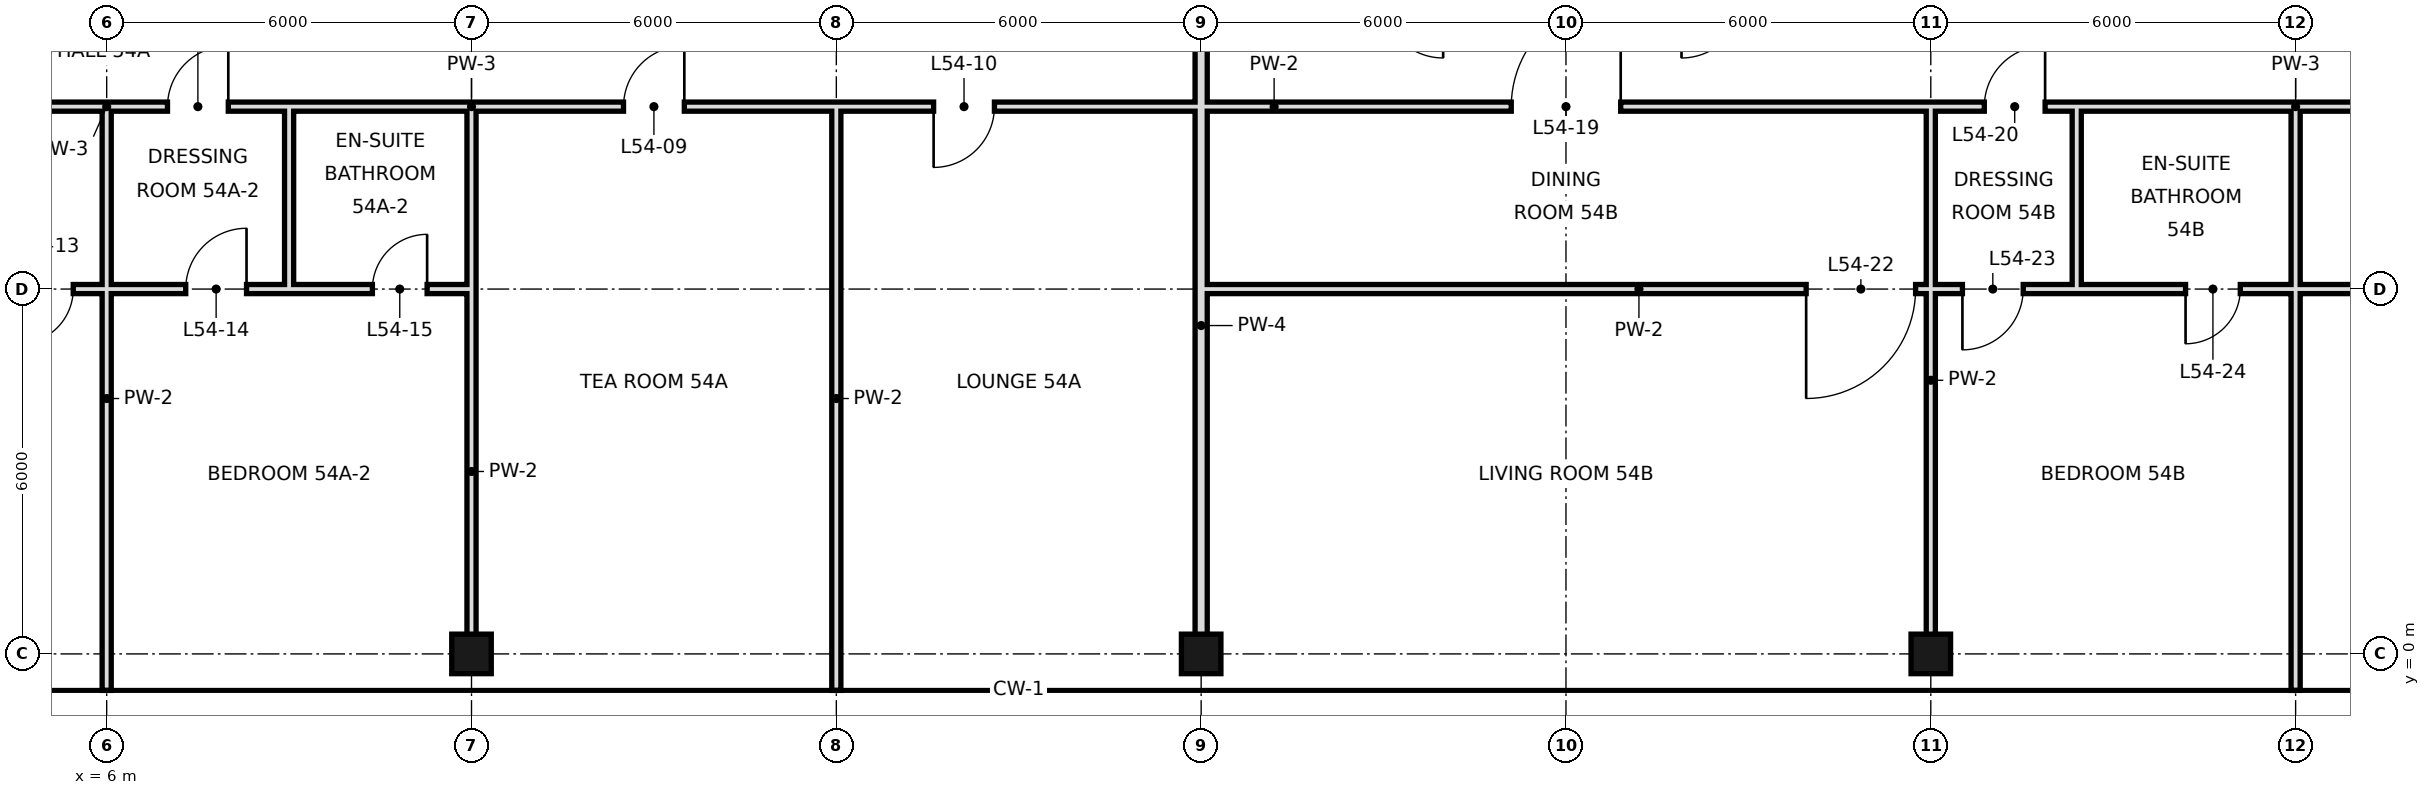
"""IFC4 building model, lengths in metres.
Left out: names, types, materials, properties, quantities, classifications, styles, units other than length and angle.
Written with IfcOpenShell. Run it as: python <this file> out.ifc"""

import sys

from ifc_helpers import new_model, si_unit, direction, frame, frame_2d, origin, origin_2d, place, context, subcontext, project, spatial, rectangle, hollow_rectangle, extrude, element, fill, save


model = new_model("IFC4")
c1 = context("Model", 3, precision=1e-05, world=origin(), true_north=direction((0.0, 1.0)))
c2 = subcontext(c1, "Body", "Model", "MODEL_VIEW")
j1 = project(units=[si_unit("LENGTHUNIT", "METRE"), si_unit("PLANEANGLEUNIT", "RADIAN")], contexts=[c1])
p1 = place(None, origin())
s1 = spatial("IfcSite", under=j1, at=p1, CompositionType="ELEMENT")
p2 = place(p1, origin())
s2 = spatial("IfcBuilding", under=s1, at=p2, CompositionType="ELEMENT")
p3 = place(p2, frame((0.0, 0.0, 229.8)))
s3 = spatial("IfcBuildingStorey", under=s2, at=p3, CompositionType="ELEMENT", Elevation=229.8)
for number, where, z_axis, x_axis in (
    (1, (12.0, 0.0, 0.0), (0.0, 0.0, 1.0), (1.0, 0.0, 0.0)),
    (2, (24.0, 0.0, 0.0), (0.0, 0.0, 1.0), (1.0, 0.0, 0.0)),
    (3, (36.0, 0.0, 0.0), (0.0, 0.0, 1.0), (1.0, 0.0, 0.0)),
):
    element("IfcColumn", number, at=place(p3, frame(where, z_axis=z_axis, x_axis=x_axis)), inside=s3, PredefinedType="COLUMN", context=c2, shape_type="SweptSolid", body=[
        extrude(hollow_rectangle(XDim=0.65, YDim=0.65, WallThickness=0.032, at=origin_2d()), origin(), (0.0, 0.0, 1.0), 4.4),
    ])
p4 = place(p3, frame((12.0, 0.0, 0.0), z_axis=(0.0, 0.0, 1.0), x_axis=(0.0, 1.0, 0.0)))
e4 = element("IfcWall", 4, at=p4, inside=s3, PredefinedType="PARTITIONING", context=c2, shape_type="SweptSolid", body=[
    extrude(rectangle(XDim=6.0, YDim=0.15, at=frame_2d((3.0, 0.0))), origin(), (0.0, 0.0, 1.0), 3.4),
])
p5 = place(p3, frame((12.0, 6.0, 0.0), z_axis=(0.0, 0.0, 1.0), x_axis=(0.0, 1.0, 0.0)))
e5 = element("IfcWall", 5, at=p5, inside=s3, PredefinedType="PARTITIONING", context=c2, shape_type="SweptSolid", body=[
    extrude(rectangle(XDim=3.0, YDim=0.15, at=frame_2d((1.5, 0.0))), origin(), (0.0, 0.0, 1.0), 3.4),
])
p6 = place(p3, frame((18.0, -0.6, 0.0), z_axis=(0.0, 0.0, 1.0), x_axis=(0.0, 1.0, 0.0)))
e6 = element("IfcWall", 6, at=p6, inside=s3, PredefinedType="PARTITIONING", context=c2, shape_type="SweptSolid", body=[
    extrude(rectangle(XDim=9.6, YDim=0.15, at=frame_2d((4.8, 0.0))), origin(), (0.0, 0.0, 1.0), 3.4),
])
p7 = place(p3, frame((24.0, 0.0, 0.0), z_axis=(0.0, 0.0, 1.0), x_axis=(0.0, 1.0, 0.0)))
e7 = element("IfcWall", 7, at=p7, inside=s3, PredefinedType="SOLIDWALL", context=c2, shape_type="SweptSolid", body=[
    extrude(rectangle(XDim=10.8, YDim=0.2, at=frame_2d((5.4, 0.0))), origin(), (0.0, 0.0, 1.0), 3.4),
])
p8 = place(p3, frame((36.0, 0.0, 0.0), z_axis=(0.0, 0.0, 1.0), x_axis=(0.0, 1.0, 0.0)))
e8 = element("IfcWall", 8, at=p8, inside=s3, PredefinedType="PARTITIONING", context=c2, shape_type="SweptSolid", body=[
    extrude(rectangle(XDim=9.0, YDim=0.15, at=frame_2d((4.5, 0.0))), origin(), (0.0, 0.0, 1.0), 3.4),
])
p9 = place(p3, frame((38.4, 6.0, 0.0), z_axis=(0.0, 0.0, 1.0), x_axis=(0.0, 1.0, 0.0)))
e9 = element("IfcWall", 9, at=p9, inside=s3, PredefinedType="PARTITIONING", context=c2, shape_type="SweptSolid", body=[
    extrude(rectangle(XDim=3.0, YDim=0.15, at=frame_2d((1.5, 0.0))), origin(), (0.0, 0.0, 1.0), 4.1),
])
p10 = place(p3, frame((42.0, -0.6, 0.0), z_axis=(0.0, 0.0, 1.0), x_axis=(0.0, 1.0, 0.0)))
e10 = element("IfcWall", 10, at=p10, inside=s3, PredefinedType="PARTITIONING", context=c2, shape_type="SweptSolid", body=[
    extrude(rectangle(XDim=6.6, YDim=0.15, at=frame_2d((3.3, 0.0))), origin(), (0.0, 0.0, 1.0), 3.4),
])
p11 = place(p3, frame((42.0, 6.0, 0.0), z_axis=(0.0, 0.0, 1.0), x_axis=(0.0, 1.0, 0.0)))
e11 = element("IfcWall", 11, at=p11, inside=s3, PredefinedType="PARTITIONING", context=c2, shape_type="SweptSolid", body=[
    extrude(rectangle(XDim=3.0, YDim=0.15, at=frame_2d((1.5, 0.0))), origin(), (0.0, 0.0, 1.0), 3.4),
])
p12 = place(p3, frame((6.0, -0.6, 0.0), z_axis=(0.0, 0.0, 1.0), x_axis=(0.0, 1.0, 0.0)))
e12 = element("IfcWall", 12, at=p12, inside=s3, PredefinedType="PARTITIONING", context=c2, shape_type="SweptSolid", body=[
    extrude(rectangle(XDim=6.6, YDim=0.15, at=frame_2d((3.3, 0.0))), origin(), (0.0, 0.0, 1.0), 3.4),
])
p13 = place(p3, frame((6.0, 6.0, 0.0), z_axis=(0.0, 0.0, 1.0), x_axis=(0.0, 1.0, 0.0)))
e13 = element("IfcWall", 13, at=p13, inside=s3, PredefinedType="PARTITIONING", context=c2, shape_type="SweptSolid", body=[
    extrude(rectangle(XDim=3.0, YDim=0.15, at=frame_2d((1.5, 0.0))), origin(), (0.0, 0.0, 1.0), 3.4),
])
p14 = place(p3, frame((9.0, 6.0, 0.0), z_axis=(0.0, 0.0, 1.0), x_axis=(0.0, 1.0, 0.0)))
e14 = element("IfcWall", 14, at=p14, inside=s3, PredefinedType="PARTITIONING", context=c2, shape_type="SweptSolid", body=[
    extrude(rectangle(XDim=3.0, YDim=0.15, at=frame_2d((1.5, 0.0))), origin(), (0.0, 0.0, 1.0), 4.1),
])
p15 = place(p3, frame((6.0, 6.0, 0.0), z_axis=(0.0, 0.0, 1.0), x_axis=(1.0, 0.0, 0.0)))
e15 = element("IfcWall", 15, at=p15, inside=s3, PredefinedType="PARTITIONING", context=c2, shape_type="SweptSolid", body=[
    extrude(rectangle(XDim=3.0, YDim=0.15, at=frame_2d((1.5, 0.0))), origin(), (0.0, 0.0, 1.0), 3.65),
])
p16 = place(p15, frame((1.3, 0.0, 0.0)))
e16 = element("IfcOpeningElement", 16, at=p16, cuts=e15, PredefinedType="OPENING", context=c2, shape_type="SweptSolid", body=[
    extrude(rectangle(XDim=1.0, YDim=2.4, at=frame_2d((0.5, 1.2))), frame((0.0, 0.085, 0.0), z_axis=(0.0, -1.0, 0.0), x_axis=(1.0, 0.0, 0.0)), (0.0, 0.0, 1.0), 0.17),
])
p17 = place(p3, frame((24.0, 6.0, 0.0), z_axis=(0.0, 0.0, 1.0), x_axis=(1.0, 0.0, 0.0)))
e17 = element("IfcWall", 17, at=p17, inside=s3, PredefinedType="PARTITIONING", context=c2, shape_type="SweptSolid", body=[
    extrude(rectangle(XDim=14.4, YDim=0.15, at=frame_2d((7.2, 0.0))), origin(), (0.0, 0.0, 1.0), 3.65),
])
p18 = place(p17, frame((9.95, 0.0, 0.0)))
e18 = element("IfcOpeningElement", 18, at=p18, cuts=e17, PredefinedType="OPENING", context=c2, shape_type="SweptSolid", body=[
    extrude(rectangle(XDim=1.8, YDim=2.4, at=frame_2d((0.9, 1.2))), frame((0.0, 0.085, 0.0), z_axis=(0.0, -1.0, 0.0), x_axis=(1.0, 0.0, 0.0)), (0.0, 0.0, 1.0), 0.17),
])
p19 = place(p17, frame((12.52, 0.0, 0.0)))
e19 = element("IfcOpeningElement", 19, at=p19, cuts=e17, PredefinedType="OPENING", context=c2, shape_type="SweptSolid", body=[
    extrude(rectangle(XDim=1.0, YDim=2.4, at=frame_2d((0.5, 1.2))), frame((0.0, 0.085, 0.0), z_axis=(0.0, -1.0, 0.0), x_axis=(1.0, 0.0, 0.0)), (0.0, 0.0, 1.0), 0.17),
])
p20 = place(p3, frame((42.0, 6.0, 0.0), z_axis=(0.0, 0.0, 1.0), x_axis=(1.0, 0.0, 0.0)))
e20 = element("IfcWall", 20, at=p20, inside=s3, PredefinedType="PARTITIONING", context=c2, shape_type="SweptSolid", body=[
    extrude(rectangle(XDim=12.0, YDim=0.15, at=frame_2d((6.0, 0.0))), origin(), (0.0, 0.0, 1.0), 3.65),
])
p21 = place(p20, frame((3.4, 0.0, 0.0)))
e21 = element("IfcOpeningElement", 21, at=p21, cuts=e20, PredefinedType="OPENING", context=c2, shape_type="SweptSolid", body=[
    extrude(rectangle(XDim=1.0, YDim=2.4, at=frame_2d((0.5, 1.2))), frame((0.0, 0.085, 0.0), z_axis=(0.0, -1.0, 0.0), x_axis=(1.0, 0.0, 0.0)), (0.0, 0.0, 1.0), 0.17),
])
p22 = place(p3, frame((3.6, 6.0, 0.0), z_axis=(0.0, 0.0, 1.0), x_axis=(1.0, 0.0, 0.0)))
e22 = element("IfcWall", 22, at=p22, inside=s3, PredefinedType="PARTITIONING", context=c2, shape_type="SweptSolid", body=[
    extrude(rectangle(XDim=2.4, YDim=0.15, at=frame_2d((1.2, 0.0))), origin(), (0.0, 0.0, 1.0), 3.65),
])
p23 = place(p22, frame((0.95, 0.0, 0.0)))
e23 = element("IfcOpeningElement", 23, at=p23, cuts=e22, PredefinedType="OPENING", context=c2, shape_type="SweptSolid", body=[
    extrude(rectangle(XDim=0.9, YDim=2.4, at=frame_2d((0.45, 1.2))), frame((0.0, 0.085, 0.0), z_axis=(0.0, -1.0, 0.0), x_axis=(1.0, 0.0, 0.0)), (0.0, 0.0, 1.0), 0.17),
])
p24 = place(p3, frame((9.0, 6.0, 0.0), z_axis=(0.0, 0.0, 1.0), x_axis=(1.0, 0.0, 0.0)))
e24 = element("IfcWall", 24, at=p24, inside=s3, PredefinedType="PARTITIONING", context=c2, shape_type="SweptSolid", body=[
    extrude(rectangle(XDim=3.0, YDim=0.15, at=frame_2d((1.5, 0.0))), origin(), (0.0, 0.0, 1.0), 3.65),
])
p25 = place(p24, frame((1.37, 0.0, 0.0)))
e25 = element("IfcOpeningElement", 25, at=p25, cuts=e24, PredefinedType="OPENING", context=c2, shape_type="SweptSolid", body=[
    extrude(rectangle(XDim=0.9, YDim=2.4, at=frame_2d((0.45, 1.2))), frame((0.0, 0.085, 0.0), z_axis=(0.0, -1.0, 0.0), x_axis=(1.0, 0.0, 0.0)), (0.0, 0.0, 1.0), 0.17),
])
p26 = place(p3, frame((38.4, 6.0, 0.0), z_axis=(0.0, 0.0, 1.0), x_axis=(1.0, 0.0, 0.0)))
e26 = element("IfcWall", 26, at=p26, inside=s3, PredefinedType="PARTITIONING", context=c2, shape_type="SweptSolid", body=[
    extrude(rectangle(XDim=3.6, YDim=0.15, at=frame_2d((1.8, 0.0))), origin(), (0.0, 0.0, 1.0), 3.65),
])
p27 = place(p26, frame((1.79, 0.0, 0.0)))
e27 = element("IfcOpeningElement", 27, at=p27, cuts=e26, PredefinedType="OPENING", context=c2, shape_type="SweptSolid", body=[
    extrude(rectangle(XDim=0.9, YDim=2.4, at=frame_2d((0.45, 1.2))), frame((0.0, 0.085, 0.0), z_axis=(0.0, -1.0, 0.0), x_axis=(1.0, 0.0, 0.0)), (0.0, 0.0, 1.0), 0.17),
])
p28 = place(p3, frame((6.0, 9.0, 0.0), z_axis=(0.0, 0.0, 1.0), x_axis=(1.0, 0.0, 0.0)))
e28 = element("IfcWall", 28, at=p28, inside=s3, PredefinedType="PARTITIONING", context=c2, shape_type="SweptSolid", body=[
    extrude(rectangle(XDim=3.0, YDim=0.15, at=frame_2d((1.5, 0.0))), origin(), (0.0, 0.0, 1.0), 4.1),
])
p29 = place(p28, frame((1.0, 0.0, 0.0)))
e29 = element("IfcOpeningElement", 29, at=p29, cuts=e28, PredefinedType="OPENING", context=c2, shape_type="SweptSolid", body=[
    extrude(rectangle(XDim=1.0, YDim=2.4, at=frame_2d((0.5, 1.2))), frame((0.0, 0.085, 0.0), z_axis=(0.0, -1.0, 0.0), x_axis=(1.0, 0.0, 0.0)), (0.0, 0.0, 1.0), 0.17),
])
p30 = place(p3, frame((12.0, 9.0, 0.0), z_axis=(0.0, 0.0, 1.0), x_axis=(1.0, 0.0, 0.0)))
e30 = element("IfcWall", 30, at=p30, inside=s3, PredefinedType="PARTITIONING", context=c2, shape_type="SweptSolid", body=[
    extrude(rectangle(XDim=26.4, YDim=0.15, at=frame_2d((13.2, 0.0))), origin(), (0.0, 0.0, 1.0), 4.1),
])
p31 = place(p30, frame((2.5, 0.0, 0.0)))
e31 = element("IfcOpeningElement", 31, at=p31, cuts=e30, PredefinedType="OPENING", context=c2, shape_type="SweptSolid", body=[
    extrude(rectangle(XDim=1.0, YDim=2.4, at=frame_2d((0.5, 1.2))), frame((0.0, 0.085, 0.0), z_axis=(0.0, -1.0, 0.0), x_axis=(1.0, 0.0, 0.0)), (0.0, 0.0, 1.0), 0.17),
])
p32 = place(p30, frame((7.6, 0.0, 0.0)))
e32 = element("IfcOpeningElement", 32, at=p32, cuts=e30, PredefinedType="OPENING", context=c2, shape_type="SweptSolid", body=[
    extrude(rectangle(XDim=1.0, YDim=2.4, at=frame_2d((0.5, 1.2))), frame((0.0, 0.085, 0.0), z_axis=(0.0, -1.0, 0.0), x_axis=(1.0, 0.0, 0.0)), (0.0, 0.0, 1.0), 0.17),
])
p33 = place(p30, frame((17.1, 0.0, 0.0)))
e33 = element("IfcOpeningElement", 33, at=p33, cuts=e30, PredefinedType="OPENING", context=c2, shape_type="SweptSolid", body=[
    extrude(rectangle(XDim=1.8, YDim=2.4, at=frame_2d((0.9, 1.2))), frame((0.0, 0.085, 0.0), z_axis=(0.0, -1.0, 0.0), x_axis=(1.0, 0.0, 0.0)), (0.0, 0.0, 1.0), 0.17),
])
p34 = place(p30, frame((24.88, 0.0, 0.0)))
e34 = element("IfcOpeningElement", 34, at=p34, cuts=e30, PredefinedType="OPENING", context=c2, shape_type="SweptSolid", body=[
    extrude(rectangle(XDim=1.0, YDim=2.4, at=frame_2d((0.5, 1.2))), frame((0.0, 0.085, 0.0), z_axis=(0.0, -1.0, 0.0), x_axis=(1.0, 0.0, 0.0)), (0.0, 0.0, 1.0), 0.17),
])
p35 = place(p3, frame((42.0, 9.0, 0.0), z_axis=(0.0, 0.0, 1.0), x_axis=(1.0, 0.0, 0.0)))
e35 = element("IfcWall", 35, at=p35, inside=s3, PredefinedType="PARTITIONING", context=c2, shape_type="SweptSolid", body=[
    extrude(rectangle(XDim=12.6, YDim=0.15, at=frame_2d((6.3, 0.0))), origin(), (0.0, 0.0, 1.0), 4.1),
])
p36 = place(p35, frame((7.6, 0.0, 0.0)))
e36 = element("IfcOpeningElement", 36, at=p36, cuts=e35, PredefinedType="OPENING", context=c2, shape_type="SweptSolid", body=[
    extrude(rectangle(XDim=1.0, YDim=2.4, at=frame_2d((0.5, 1.2))), frame((0.0, 0.085, 0.0), z_axis=(0.0, -1.0, 0.0), x_axis=(1.0, 0.0, 0.0)), (0.0, 0.0, 1.0), 0.17),
])
p37 = place(p3, frame((3.6, 9.0, 0.0), z_axis=(0.0, 0.0, 1.0), x_axis=(1.0, 0.0, 0.0)))
e37 = element("IfcWall", 37, at=p37, inside=s3, PredefinedType="PARTITIONING", context=c2, shape_type="SweptSolid", body=[
    extrude(rectangle(XDim=2.4, YDim=0.15, at=frame_2d((1.2, 0.0))), origin(), (0.0, 0.0, 1.0), 4.1),
])
p38 = place(p3, frame((9.0, 9.0, 0.0), z_axis=(0.0, 0.0, 1.0), x_axis=(1.0, 0.0, 0.0)))
e38 = element("IfcWall", 38, at=p38, inside=s3, PredefinedType="PARTITIONING", context=c2, shape_type="SweptSolid", body=[
    extrude(rectangle(XDim=3.0, YDim=0.15, at=frame_2d((1.5, 0.0))), origin(), (0.0, 0.0, 1.0), 4.1),
])
p39 = place(p3, frame((38.4, 9.0, 0.0), z_axis=(0.0, 0.0, 1.0), x_axis=(1.0, 0.0, 0.0)))
e39 = element("IfcWall", 39, at=p39, inside=s3, PredefinedType="PARTITIONING", context=c2, shape_type="SweptSolid", body=[
    extrude(rectangle(XDim=3.6, YDim=0.15, at=frame_2d((1.8, 0.0))), origin(), (0.0, 0.0, 1.0), 4.1),
])
p40 = place(p29, frame((1.0, 0.0, 0.0), z_axis=(0.0, 0.0, 1.0), x_axis=(-1.0, 0.0, 0.0)))
e40 = element("IfcDoor", 40, at=p40, inside=s3, OperationType="SINGLE_SWING_LEFT", PredefinedType="DOOR", context=c2, shape_type="SweptSolid", body=[
    extrude(rectangle(XDim=1.0, YDim=2.4, at=frame_2d((0.5, 1.2))), frame((0.0, 0.025, 0.0), z_axis=(0.0, -1.0, 0.0), x_axis=(1.0, 0.0, 0.0)), (0.0, 0.0, 1.0), 0.05),
])
fill(e29, e40)
p41 = place(p31, frame((1.0, 0.0, 0.0), z_axis=(0.0, 0.0, 1.0), x_axis=(-1.0, 0.0, 0.0)))
e41 = element("IfcDoor", 41, at=p41, inside=s3, OperationType="SINGLE_SWING_LEFT", PredefinedType="DOOR", context=c2, shape_type="SweptSolid", body=[
    extrude(rectangle(XDim=1.0, YDim=2.4, at=frame_2d((0.5, 1.2))), frame((0.0, 0.025, 0.0), z_axis=(0.0, -1.0, 0.0), x_axis=(1.0, 0.0, 0.0)), (0.0, 0.0, 1.0), 0.05),
])
fill(e31, e41)
p42 = place(p32, frame((1.0, 0.0, 0.0), z_axis=(0.0, 0.0, 1.0), x_axis=(-1.0, 0.0, 0.0)))
e42 = element("IfcDoor", 42, at=p42, inside=s3, OperationType="SINGLE_SWING_RIGHT", PredefinedType="DOOR", context=c2, shape_type="SweptSolid", body=[
    extrude(rectangle(XDim=1.0, YDim=2.4, at=frame_2d((0.5, 1.2))), frame((0.0, 0.025, 0.0), z_axis=(0.0, -1.0, 0.0), x_axis=(1.0, 0.0, 0.0)), (0.0, 0.0, 1.0), 0.05),
])
fill(e32, e42)
p43 = place(p23, frame((0.9, 0.0, 0.0), z_axis=(0.0, 0.0, 1.0), x_axis=(-1.0, 0.0, 0.0)))
e43 = element("IfcDoor", 43, at=p43, inside=s3, OperationType="SINGLE_SWING_RIGHT", PredefinedType="DOOR", context=c2, shape_type="SweptSolid", body=[
    extrude(rectangle(XDim=0.9, YDim=2.4, at=frame_2d((0.45, 1.2))), frame((0.0, 0.025, 0.0), z_axis=(0.0, -1.0, 0.0), x_axis=(1.0, 0.0, 0.0)), (0.0, 0.0, 1.0), 0.05),
])
fill(e23, e43)
p44 = place(p16, frame((1.0, 0.0, 0.0), z_axis=(0.0, 0.0, 1.0), x_axis=(-1.0, 0.0, 0.0)))
e44 = element("IfcDoor", 44, at=p44, inside=s3, OperationType="SINGLE_SWING_LEFT", PredefinedType="DOOR", context=c2, shape_type="SweptSolid", body=[
    extrude(rectangle(XDim=1.0, YDim=2.4, at=frame_2d((0.5, 1.2))), frame((0.0, 0.025, 0.0), z_axis=(0.0, -1.0, 0.0), x_axis=(1.0, 0.0, 0.0)), (0.0, 0.0, 1.0), 0.05),
])
fill(e16, e44)
p45 = place(p25, frame((0.9, 0.0, 0.0), z_axis=(0.0, 0.0, 1.0), x_axis=(-1.0, 0.0, 0.0)))
e45 = element("IfcDoor", 45, at=p45, inside=s3, OperationType="SINGLE_SWING_LEFT", PredefinedType="DOOR", context=c2, shape_type="SweptSolid", body=[
    extrude(rectangle(XDim=0.9, YDim=2.4, at=frame_2d((0.45, 1.2))), frame((0.0, 0.025, 0.0), z_axis=(0.0, -1.0, 0.0), x_axis=(1.0, 0.0, 0.0)), (0.0, 0.0, 1.0), 0.05),
])
fill(e25, e45)
p46 = place(p33, frame((1.8, 0.0, 0.0), z_axis=(0.0, 0.0, 1.0), x_axis=(-1.0, 0.0, 0.0)))
e46 = element("IfcDoor", 46, at=p46, inside=s3, OperationType="SINGLE_SWING_LEFT", PredefinedType="DOOR", context=c2, shape_type="SweptSolid", body=[
    extrude(rectangle(XDim=1.8, YDim=2.4, at=frame_2d((0.9, 1.2))), frame((0.0, 0.025, 0.0), z_axis=(0.0, -1.0, 0.0), x_axis=(1.0, 0.0, 0.0)), (0.0, 0.0, 1.0), 0.05),
])
fill(e33, e46)
p47 = place(p34, frame((1.0, 0.0, 0.0), z_axis=(0.0, 0.0, 1.0), x_axis=(-1.0, 0.0, 0.0)))
e47 = element("IfcDoor", 47, at=p47, inside=s3, OperationType="SINGLE_SWING_LEFT", PredefinedType="DOOR", context=c2, shape_type="SweptSolid", body=[
    extrude(rectangle(XDim=1.0, YDim=2.4, at=frame_2d((0.5, 1.2))), frame((0.0, 0.025, 0.0), z_axis=(0.0, -1.0, 0.0), x_axis=(1.0, 0.0, 0.0)), (0.0, 0.0, 1.0), 0.05),
])
fill(e34, e47)
p48 = place(p18, frame((1.8, 0.0, 0.0), z_axis=(0.0, 0.0, 1.0), x_axis=(-1.0, 0.0, 0.0)))
e48 = element("IfcDoor", 48, at=p48, inside=s3, OperationType="SINGLE_SWING_RIGHT", PredefinedType="DOOR", context=c2, shape_type="SweptSolid", body=[
    extrude(rectangle(XDim=1.8, YDim=2.4, at=frame_2d((0.9, 1.2))), frame((0.0, 0.025, 0.0), z_axis=(0.0, -1.0, 0.0), x_axis=(1.0, 0.0, 0.0)), (0.0, 0.0, 1.0), 0.05),
])
fill(e18, e48)
p49 = place(p19, frame((1.0, 0.0, 0.0), z_axis=(0.0, 0.0, 1.0), x_axis=(-1.0, 0.0, 0.0)))
e49 = element("IfcDoor", 49, at=p49, inside=s3, OperationType="SINGLE_SWING_RIGHT", PredefinedType="DOOR", context=c2, shape_type="SweptSolid", body=[
    extrude(rectangle(XDim=1.0, YDim=2.4, at=frame_2d((0.5, 1.2))), frame((0.0, 0.025, 0.0), z_axis=(0.0, -1.0, 0.0), x_axis=(1.0, 0.0, 0.0)), (0.0, 0.0, 1.0), 0.05),
])
fill(e19, e49)
p50 = place(p27, frame((0.9, 0.0, 0.0), z_axis=(0.0, 0.0, 1.0), x_axis=(-1.0, 0.0, 0.0)))
e50 = element("IfcDoor", 50, at=p50, inside=s3, OperationType="SINGLE_SWING_RIGHT", PredefinedType="DOOR", context=c2, shape_type="SweptSolid", body=[
    extrude(rectangle(XDim=0.9, YDim=2.4, at=frame_2d((0.45, 1.2))), frame((0.0, 0.025, 0.0), z_axis=(0.0, -1.0, 0.0), x_axis=(1.0, 0.0, 0.0)), (0.0, 0.0, 1.0), 0.05),
])
fill(e27, e50)
save(model, sys.argv[1])
